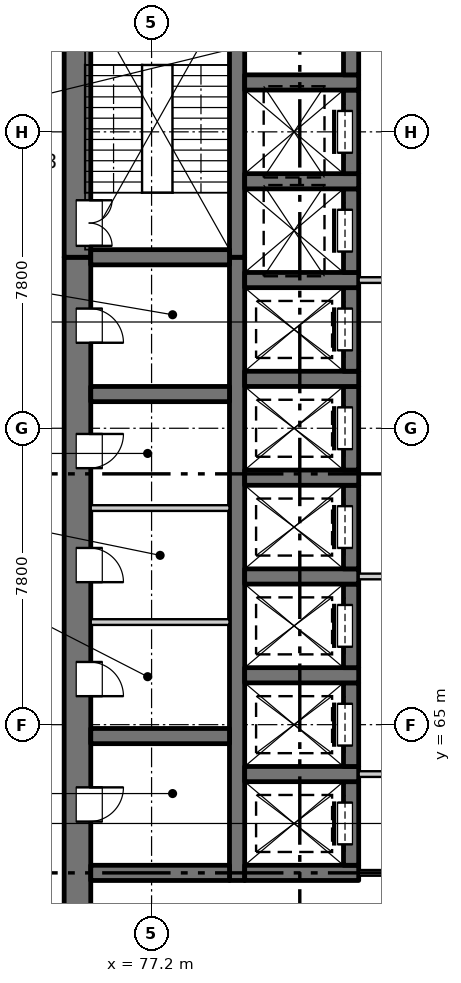
"""IFC4 building model, lengths in metres.
Left out: names, types, materials, properties, quantities, classifications, styles, units other than length and angle.
Written with IfcOpenShell. Run it as: python <this file> out.ifc"""

import sys

from ifc_helpers import new_model, si_unit, direction, frame, frame_2d, origin, place, context, subcontext, project, spatial, rectangle, extrude, element, fill, save


model = new_model("IFC4")
c1 = context("Model", 3, precision=1e-05, world=origin(), true_north=direction((0.0, 1.0)))
c2 = subcontext(c1, "Body", "Model", "MODEL_VIEW")
j1 = project(units=[si_unit("LENGTHUNIT", "METRE"), si_unit("PLANEANGLEUNIT", "RADIAN")], contexts=[c1])
p1 = place(None, origin())
s1 = spatial("IfcSite", under=j1, at=p1, CompositionType="ELEMENT")
p2 = place(p1, origin())
s2 = spatial("IfcBuilding", under=s1, at=p2, CompositionType="ELEMENT")
p3 = place(p2, frame((0.0, 0.0, 15.0)))
s3 = spatial("IfcBuildingStorey", under=s2, at=p3, CompositionType="ELEMENT", Elevation=15.0)
p4 = place(p3, frame((75.25, 54.9, -0.35), z_axis=(0.0, 0.0, 1.0), x_axis=(0.0, 1.0, 0.0)))
e1 = element("IfcWall", 1, at=p4, inside=s3, PredefinedType="SOLIDWALL", context=c2, shape_type="SweptSolid", body=[
    extrude(rectangle(XDim=22.4, YDim=0.7, at=frame_2d((11.2, 0.0))), origin(), (0.0, 0.0, 1.0), 4.6),
])
p5 = place(p4, frame((7.55, 0.0, 0.35)))
e2 = element("IfcOpeningElement", 2, at=p5, cuts=e1, PredefinedType="OPENING", context=c2, shape_type="SweptSolid", body=[
    extrude(rectangle(XDim=0.9, YDim=2.1, at=frame_2d((0.45, 1.05))), frame((0.0, 0.36, 0.0), z_axis=(0.0, -1.0, 0.0), x_axis=(1.0, 0.0, 0.0)), (0.0, 0.0, 1.0), 0.72),
])
p6 = place(p4, frame((10.85, 0.0, 0.35)))
e3 = element("IfcOpeningElement", 3, at=p6, cuts=e1, PredefinedType="OPENING", context=c2, shape_type="SweptSolid", body=[
    extrude(rectangle(XDim=0.9, YDim=2.1, at=frame_2d((0.45, 1.05))), frame((0.0, 0.36, 0.0), z_axis=(0.0, -1.0, 0.0), x_axis=(1.0, 0.0, 0.0)), (0.0, 0.0, 1.0), 0.72),
])
p7 = place(p4, frame((13.85, 0.0, 0.35)))
e4 = element("IfcOpeningElement", 4, at=p7, cuts=e1, PredefinedType="OPENING", context=c2, shape_type="SweptSolid", body=[
    extrude(rectangle(XDim=0.9, YDim=2.1, at=frame_2d((0.45, 1.05))), frame((0.0, 0.36, 0.0), z_axis=(0.0, -1.0, 0.0), x_axis=(1.0, 0.0, 0.0)), (0.0, 0.0, 1.0), 0.72),
])
p8 = place(p4, frame((16.85, 0.0, 0.35)))
e5 = element("IfcOpeningElement", 5, at=p8, cuts=e1, PredefinedType="OPENING", context=c2, shape_type="SweptSolid", body=[
    extrude(rectangle(XDim=0.9, YDim=2.1, at=frame_2d((0.45, 1.05))), frame((0.0, 0.36, 0.0), z_axis=(0.0, -1.0, 0.0), x_axis=(1.0, 0.0, 0.0)), (0.0, 0.0, 1.0), 0.72),
])
p9 = place(p4, frame((20.15, 0.0, 0.35)))
e6 = element("IfcOpeningElement", 6, at=p9, cuts=e1, PredefinedType="OPENING", context=c2, shape_type="SweptSolid", body=[
    extrude(rectangle(XDim=0.9, YDim=2.1, at=frame_2d((0.45, 1.05))), frame((0.0, 0.36, 0.0), z_axis=(0.0, -1.0, 0.0), x_axis=(1.0, 0.0, 0.0)), (0.0, 0.0, 1.0), 0.72),
])
p10 = place(p3, frame((75.25, 77.3, -0.35), z_axis=(0.0, 0.0, 1.0), x_axis=(0.0, 1.0, 0.0)))
e7 = element("IfcWall", 7, at=p10, inside=s3, PredefinedType="SOLIDWALL", context=c2, shape_type="SweptSolid", body=[
    extrude(rectangle(XDim=7.55, YDim=0.7, at=frame_2d((3.775, 0.0))), origin(), (0.0, 0.0, 1.0), 4.6),
])
p11 = place(p10, frame((0.3, 0.0, 0.35)))
e8 = element("IfcOpeningElement", 8, at=p11, cuts=e7, PredefinedType="OPENING", context=c2, shape_type="SweptSolid", body=[
    extrude(rectangle(XDim=1.2, YDim=2.1, at=frame_2d((0.6, 1.05))), frame((0.0, 0.36, 0.0), z_axis=(0.0, -1.0, 0.0), x_axis=(1.0, 0.0, 0.0)), (0.0, 0.0, 1.0), 0.72),
])
p12 = place(p3, frame((79.45, 60.9, -0.35), z_axis=(0.0, 0.0, 1.0), x_axis=(0.0, 1.0, 0.0)))
e9 = element("IfcWall", 9, at=p12, inside=s3, PredefinedType="SOLIDWALL", context=c2, shape_type="SweptSolid", body=[
    extrude(rectangle(XDim=16.4, YDim=0.4, at=frame_2d((8.2, 0.0))), origin(), (0.0, 0.0, 1.0), 4.6),
])
p13 = place(p3, frame((79.45, 77.3, -0.35), z_axis=(0.0, 0.0, 1.0), x_axis=(0.0, 1.0, 0.0)))
e10 = element("IfcWall", 10, at=p13, inside=s3, PredefinedType="SOLIDWALL", context=c2, shape_type="SweptSolid", body=[
    extrude(rectangle(XDim=6.85, YDim=0.4, at=frame_2d((3.425, 0.0))), origin(), (0.0, 0.0, 1.0), 4.6),
])
p14 = place(p3, frame((79.65, 61.1, -0.35), z_axis=(0.0, 0.0, 1.0), x_axis=(1.0, 0.0, 0.0)))
e11 = element("IfcWall", 11, at=p14, inside=s3, PredefinedType="SOLIDWALL", context=c2, shape_type="SweptSolid", body=[
    extrude(rectangle(XDim=3.0, YDim=0.4, at=frame_2d((1.5, 0.0))), origin(), (0.0, 0.0, 1.0), 4.6),
])
p15 = place(p3, frame((82.45, 61.3, -0.35), z_axis=(0.0, 0.0, 1.0), x_axis=(0.0, 1.0, 0.0)))
e12 = element("IfcWall", 12, at=p15, inside=s3, PredefinedType="SOLIDWALL", context=c2, shape_type="SweptSolid", body=[
    extrude(rectangle(XDim=2.2, YDim=0.4, at=frame_2d((1.1, 0.0))), origin(), (0.0, 0.0, 1.0), 4.6),
])
p16 = place(p15, frame((0.55, 0.0, 0.35)))
e13 = element("IfcOpeningElement", 13, at=p16, cuts=e12, PredefinedType="OPENING", context=c2, shape_type="SweptSolid", body=[
    extrude(rectangle(XDim=1.1, YDim=2.1, at=frame_2d((0.55, 1.05))), frame((0.0, 0.21, 0.0), z_axis=(0.0, -1.0, 0.0), x_axis=(1.0, 0.0, 0.0)), (0.0, 0.0, 1.0), 0.42),
])
p17 = place(p3, frame((79.65, 63.7, -0.35), z_axis=(0.0, 0.0, 1.0), x_axis=(1.0, 0.0, 0.0)))
e14 = element("IfcWall", 14, at=p17, inside=s3, PredefinedType="SOLIDWALL", context=c2, shape_type="SweptSolid", body=[
    extrude(rectangle(XDim=3.0, YDim=0.4, at=frame_2d((1.5, 0.0))), origin(), (0.0, 0.0, 1.0), 4.6),
])
p18 = place(p3, frame((82.45, 63.9, -0.35), z_axis=(0.0, 0.0, 1.0), x_axis=(0.0, 1.0, 0.0)))
e15 = element("IfcWall", 15, at=p18, inside=s3, PredefinedType="SOLIDWALL", context=c2, shape_type="SweptSolid", body=[
    extrude(rectangle(XDim=2.2, YDim=0.4, at=frame_2d((1.1, 0.0))), origin(), (0.0, 0.0, 1.0), 4.6),
])
p19 = place(p18, frame((0.55, 0.0, 0.35)))
e16 = element("IfcOpeningElement", 16, at=p19, cuts=e15, PredefinedType="OPENING", context=c2, shape_type="SweptSolid", body=[
    extrude(rectangle(XDim=1.1, YDim=2.1, at=frame_2d((0.55, 1.05))), frame((0.0, 0.21, 0.0), z_axis=(0.0, -1.0, 0.0), x_axis=(1.0, 0.0, 0.0)), (0.0, 0.0, 1.0), 0.42),
])
p20 = place(p3, frame((79.65, 66.3, -0.35), z_axis=(0.0, 0.0, 1.0), x_axis=(1.0, 0.0, 0.0)))
e17 = element("IfcWall", 17, at=p20, inside=s3, PredefinedType="SOLIDWALL", context=c2, shape_type="SweptSolid", body=[
    extrude(rectangle(XDim=3.0, YDim=0.4, at=frame_2d((1.5, 0.0))), origin(), (0.0, 0.0, 1.0), 4.6),
])
p21 = place(p3, frame((82.45, 66.5, -0.35), z_axis=(0.0, 0.0, 1.0), x_axis=(0.0, 1.0, 0.0)))
e18 = element("IfcWall", 18, at=p21, inside=s3, PredefinedType="SOLIDWALL", context=c2, shape_type="SweptSolid", body=[
    extrude(rectangle(XDim=2.2, YDim=0.4, at=frame_2d((1.1, 0.0))), origin(), (0.0, 0.0, 1.0), 4.6),
])
p22 = place(p21, frame((0.55, 0.0, 0.35)))
e19 = element("IfcOpeningElement", 19, at=p22, cuts=e18, PredefinedType="OPENING", context=c2, shape_type="SweptSolid", body=[
    extrude(rectangle(XDim=1.1, YDim=2.1, at=frame_2d((0.55, 1.05))), frame((0.0, 0.21, 0.0), z_axis=(0.0, -1.0, 0.0), x_axis=(1.0, 0.0, 0.0)), (0.0, 0.0, 1.0), 0.42),
])
p23 = place(p3, frame((79.65, 68.9, -0.35), z_axis=(0.0, 0.0, 1.0), x_axis=(1.0, 0.0, 0.0)))
e20 = element("IfcWall", 20, at=p23, inside=s3, PredefinedType="SOLIDWALL", context=c2, shape_type="SweptSolid", body=[
    extrude(rectangle(XDim=3.0, YDim=0.4, at=frame_2d((1.5, 0.0))), origin(), (0.0, 0.0, 1.0), 4.6),
])
p24 = place(p3, frame((82.45, 69.1, -0.35), z_axis=(0.0, 0.0, 1.0), x_axis=(0.0, 1.0, 0.0)))
e21 = element("IfcWall", 21, at=p24, inside=s3, PredefinedType="SOLIDWALL", context=c2, shape_type="SweptSolid", body=[
    extrude(rectangle(XDim=2.2, YDim=0.4, at=frame_2d((1.1, 0.0))), origin(), (0.0, 0.0, 1.0), 4.6),
])
p25 = place(p24, frame((0.55, 0.0, 0.35)))
e22 = element("IfcOpeningElement", 22, at=p25, cuts=e21, PredefinedType="OPENING", context=c2, shape_type="SweptSolid", body=[
    extrude(rectangle(XDim=1.1, YDim=2.1, at=frame_2d((0.55, 1.05))), frame((0.0, 0.21, 0.0), z_axis=(0.0, -1.0, 0.0), x_axis=(1.0, 0.0, 0.0)), (0.0, 0.0, 1.0), 0.42),
])
p26 = place(p3, frame((79.65, 71.5, -0.35), z_axis=(0.0, 0.0, 1.0), x_axis=(1.0, 0.0, 0.0)))
e23 = element("IfcWall", 23, at=p26, inside=s3, PredefinedType="SOLIDWALL", context=c2, shape_type="SweptSolid", body=[
    extrude(rectangle(XDim=3.0, YDim=0.4, at=frame_2d((1.5, 0.0))), origin(), (0.0, 0.0, 1.0), 4.6),
])
p27 = place(p3, frame((82.45, 71.7, -0.35), z_axis=(0.0, 0.0, 1.0), x_axis=(0.0, 1.0, 0.0)))
e24 = element("IfcWall", 24, at=p27, inside=s3, PredefinedType="SOLIDWALL", context=c2, shape_type="SweptSolid", body=[
    extrude(rectangle(XDim=2.2, YDim=0.4, at=frame_2d((1.1, 0.0))), origin(), (0.0, 0.0, 1.0), 4.6),
])
p28 = place(p27, frame((0.55, 0.0, 0.35)))
e25 = element("IfcOpeningElement", 25, at=p28, cuts=e24, PredefinedType="OPENING", context=c2, shape_type="SweptSolid", body=[
    extrude(rectangle(XDim=1.1, YDim=2.1, at=frame_2d((0.55, 1.05))), frame((0.0, 0.21, 0.0), z_axis=(0.0, -1.0, 0.0), x_axis=(1.0, 0.0, 0.0)), (0.0, 0.0, 1.0), 0.42),
])
p29 = place(p3, frame((79.65, 74.1, -0.35), z_axis=(0.0, 0.0, 1.0), x_axis=(1.0, 0.0, 0.0)))
e26 = element("IfcWall", 26, at=p29, inside=s3, PredefinedType="SOLIDWALL", context=c2, shape_type="SweptSolid", body=[
    extrude(rectangle(XDim=3.0, YDim=0.4, at=frame_2d((1.5, 0.0))), origin(), (0.0, 0.0, 1.0), 4.6),
])
p30 = place(p3, frame((82.45, 74.3, -0.35), z_axis=(0.0, 0.0, 1.0), x_axis=(0.0, 1.0, 0.0)))
e27 = element("IfcWall", 27, at=p30, inside=s3, PredefinedType="SOLIDWALL", context=c2, shape_type="SweptSolid", body=[
    extrude(rectangle(XDim=2.2, YDim=0.4, at=frame_2d((1.1, 0.0))), origin(), (0.0, 0.0, 1.0), 4.6),
])
p31 = place(p30, frame((0.55, 0.0, 0.35)))
e28 = element("IfcOpeningElement", 28, at=p31, cuts=e27, PredefinedType="OPENING", context=c2, shape_type="SweptSolid", body=[
    extrude(rectangle(XDim=1.1, YDim=2.1, at=frame_2d((0.55, 1.05))), frame((0.0, 0.21, 0.0), z_axis=(0.0, -1.0, 0.0), x_axis=(1.0, 0.0, 0.0)), (0.0, 0.0, 1.0), 0.42),
])
p32 = place(p3, frame((79.65, 76.7, -0.35), z_axis=(0.0, 0.0, 1.0), x_axis=(1.0, 0.0, 0.0)))
e29 = element("IfcWall", 29, at=p32, inside=s3, PredefinedType="SOLIDWALL", context=c2, shape_type="SweptSolid", body=[
    extrude(rectangle(XDim=3.0, YDim=0.4, at=frame_2d((1.5, 0.0))), origin(), (0.0, 0.0, 1.0), 4.6),
])
p33 = place(p3, frame((82.45, 76.9, -0.35), z_axis=(0.0, 0.0, 1.0), x_axis=(0.0, 1.0, 0.0)))
e30 = element("IfcWall", 30, at=p33, inside=s3, PredefinedType="SOLIDWALL", context=c2, shape_type="SweptSolid", body=[
    extrude(rectangle(XDim=2.2, YDim=0.4, at=frame_2d((1.1, 0.0))), origin(), (0.0, 0.0, 1.0), 4.6),
])
p34 = place(p33, frame((0.55, 0.0, 0.35)))
e31 = element("IfcOpeningElement", 31, at=p34, cuts=e30, PredefinedType="OPENING", context=c2, shape_type="SweptSolid", body=[
    extrude(rectangle(XDim=1.1, YDim=2.1, at=frame_2d((0.55, 1.05))), frame((0.0, 0.21, 0.0), z_axis=(0.0, -1.0, 0.0), x_axis=(1.0, 0.0, 0.0)), (0.0, 0.0, 1.0), 0.42),
])
p35 = place(p3, frame((79.65, 79.3, -0.35), z_axis=(0.0, 0.0, 1.0), x_axis=(1.0, 0.0, 0.0)))
e32 = element("IfcWall", 32, at=p35, inside=s3, PredefinedType="SOLIDWALL", context=c2, shape_type="SweptSolid", body=[
    extrude(rectangle(XDim=3.0, YDim=0.4, at=frame_2d((1.5, 0.0))), origin(), (0.0, 0.0, 1.0), 4.6),
])
p36 = place(p3, frame((82.45, 79.5, -0.35), z_axis=(0.0, 0.0, 1.0), x_axis=(0.0, 1.0, 0.0)))
e33 = element("IfcWall", 33, at=p36, inside=s3, PredefinedType="SOLIDWALL", context=c2, shape_type="SweptSolid", body=[
    extrude(rectangle(XDim=2.2, YDim=0.4, at=frame_2d((1.1, 0.0))), origin(), (0.0, 0.0, 1.0), 4.6),
])
p37 = place(p36, frame((0.55, 0.0, 0.35)))
e34 = element("IfcOpeningElement", 34, at=p37, cuts=e33, PredefinedType="OPENING", context=c2, shape_type="SweptSolid", body=[
    extrude(rectangle(XDim=1.1, YDim=2.1, at=frame_2d((0.55, 1.05))), frame((0.0, 0.21, 0.0), z_axis=(0.0, -1.0, 0.0), x_axis=(1.0, 0.0, 0.0)), (0.0, 0.0, 1.0), 0.42),
])
p38 = place(p3, frame((79.65, 81.9, -0.35), z_axis=(0.0, 0.0, 1.0), x_axis=(1.0, 0.0, 0.0)))
e35 = element("IfcWall", 35, at=p38, inside=s3, PredefinedType="SOLIDWALL", context=c2, shape_type="SweptSolid", body=[
    extrude(rectangle(XDim=3.0, YDim=0.4, at=frame_2d((1.5, 0.0))), origin(), (0.0, 0.0, 1.0), 4.6),
])
p39 = place(p3, frame((82.45, 82.1, -0.35), z_axis=(0.0, 0.0, 1.0), x_axis=(0.0, 1.0, 0.0)))
e36 = element("IfcWall", 36, at=p39, inside=s3, PredefinedType="SOLIDWALL", context=c2, shape_type="SweptSolid", body=[
    extrude(rectangle(XDim=2.05, YDim=0.4, at=frame_2d((1.025, 0.0))), origin(), (0.0, 0.0, 1.0), 4.6),
])
p40 = place(p39, frame((0.65, 0.0, 0.35)))
e37 = element("IfcOpeningElement", 37, at=p40, cuts=e36, PredefinedType="OPENING", context=c2, shape_type="SweptSolid", body=[
    extrude(rectangle(XDim=0.9, YDim=2.1, at=frame_2d((0.45, 1.05))), frame((0.0, 0.21, 0.0), z_axis=(0.0, -1.0, 0.0), x_axis=(1.0, 0.0, 0.0)), (0.0, 0.0, 1.0), 0.42),
])
for number, where, z_axis, x_axis in (
    (38, (75.6, 61.1, -0.35), (0.0, 0.0, 1.0), (1.0, 0.0, 0.0)),
    (39, (75.6, 64.7, -0.35), (0.0, 0.0, 1.0), (1.0, 0.0, 0.0)),
    (40, (75.6, 73.7, -0.35), (0.0, 0.0, 1.0), (1.0, 0.0, 0.0)),
    (41, (75.6, 77.3, -0.35), (0.0, 0.0, 1.0), (1.0, 0.0, 0.0)),
):
    element("IfcWall", number, at=place(p3, frame(where, z_axis=z_axis, x_axis=x_axis)), inside=s3, PredefinedType="SOLIDWALL", context=c2, shape_type="SweptSolid", body=[
        extrude(rectangle(XDim=3.65, YDim=0.4, at=frame_2d((1.825, 0.0))), origin(), (0.0, 0.0, 1.0), 4.6),
    ])
p41 = place(p3, frame((82.65, 61.1, 0.0), z_axis=(0.0, 0.0, 1.0), x_axis=(1.0, 0.0, 0.0)))
e42 = element("IfcWall", 42, at=p41, inside=s3, PredefinedType="PARTITIONING", context=c2, shape_type="SweptSolid", body=[
    extrude(rectangle(XDim=4.7, YDim=0.15, at=frame_2d((2.35, 0.0))), origin(), (0.0, 0.0, 1.0), 4.25),
])
p42 = place(p41, frame((1.45, 0.0, 0.0)))
e43 = element("IfcOpeningElement", 43, at=p42, cuts=e42, PredefinedType="OPENING", context=c2, shape_type="SweptSolid", body=[
    extrude(rectangle(XDim=1.8, YDim=2.1, at=frame_2d((0.9, 1.05))), frame((0.0, 0.085, 0.0), z_axis=(0.0, -1.0, 0.0), x_axis=(1.0, 0.0, 0.0)), (0.0, 0.0, 1.0), 0.17),
])
p43 = place(p3, frame((82.65, 63.7, 0.0), z_axis=(0.0, 0.0, 1.0), x_axis=(1.0, 0.0, 0.0)))
e44 = element("IfcWall", 44, at=p43, inside=s3, PredefinedType="PARTITIONING", context=c2, shape_type="SweptSolid", body=[
    extrude(rectangle(XDim=4.7, YDim=0.15, at=frame_2d((2.35, 0.0))), origin(), (0.0, 0.0, 1.0), 4.25),
])
p44 = place(p43, frame((1.45, 0.0, 0.0)))
e45 = element("IfcOpeningElement", 45, at=p44, cuts=e44, PredefinedType="OPENING", context=c2, shape_type="SweptSolid", body=[
    extrude(rectangle(XDim=1.8, YDim=2.1, at=frame_2d((0.9, 1.05))), frame((0.0, 0.085, 0.0), z_axis=(0.0, -1.0, 0.0), x_axis=(1.0, 0.0, 0.0)), (0.0, 0.0, 1.0), 0.17),
])
p45 = place(p3, frame((75.6, 67.7, 0.0), z_axis=(0.0, 0.0, 1.0), x_axis=(1.0, 0.0, 0.0)))
e46 = element("IfcWall", 46, at=p45, inside=s3, PredefinedType="PARTITIONING", context=c2, shape_type="SweptSolid", body=[
    extrude(rectangle(XDim=3.65, YDim=0.15, at=frame_2d((1.825, 0.0))), origin(), (0.0, 0.0, 1.0), 4.25),
])
p46 = place(p3, frame((82.65, 68.9, 0.0), z_axis=(0.0, 0.0, 1.0), x_axis=(1.0, 0.0, 0.0)))
e47 = element("IfcWall", 47, at=p46, inside=s3, PredefinedType="PARTITIONING", context=c2, shape_type="SweptSolid", body=[
    extrude(rectangle(XDim=4.7, YDim=0.15, at=frame_2d((2.35, 0.0))), origin(), (0.0, 0.0, 1.0), 4.25),
])
p47 = place(p46, frame((1.45, 0.0, 0.0)))
e48 = element("IfcOpeningElement", 48, at=p47, cuts=e47, PredefinedType="OPENING", context=c2, shape_type="SweptSolid", body=[
    extrude(rectangle(XDim=1.8, YDim=2.1, at=frame_2d((0.9, 1.05))), frame((0.0, 0.085, 0.0), z_axis=(0.0, -1.0, 0.0), x_axis=(1.0, 0.0, 0.0)), (0.0, 0.0, 1.0), 0.17),
])
p48 = place(p3, frame((75.6, 70.7, 0.0), z_axis=(0.0, 0.0, 1.0), x_axis=(1.0, 0.0, 0.0)))
e49 = element("IfcWall", 49, at=p48, inside=s3, PredefinedType="PARTITIONING", context=c2, shape_type="SweptSolid", body=[
    extrude(rectangle(XDim=3.65, YDim=0.15, at=frame_2d((1.825, 0.0))), origin(), (0.0, 0.0, 1.0), 4.25),
])
p49 = place(p3, frame((82.65, 76.7, 0.0), z_axis=(0.0, 0.0, 1.0), x_axis=(1.0, 0.0, 0.0)))
e50 = element("IfcWall", 50, at=p49, inside=s3, PredefinedType="PARTITIONING", context=c2, shape_type="SweptSolid", body=[
    extrude(rectangle(XDim=4.7, YDim=0.15, at=frame_2d((2.35, 0.0))), origin(), (0.0, 0.0, 1.0), 4.25),
])
p50 = place(p49, frame((1.45, 0.0, 0.0)))
e51 = element("IfcOpeningElement", 51, at=p50, cuts=e50, PredefinedType="OPENING", context=c2, shape_type="SweptSolid", body=[
    extrude(rectangle(XDim=1.8, YDim=2.1, at=frame_2d((0.9, 1.05))), frame((0.0, 0.085, 0.0), z_axis=(0.0, -1.0, 0.0), x_axis=(1.0, 0.0, 0.0)), (0.0, 0.0, 1.0), 0.17),
])
p51 = place(p16, origin())
e52 = element("IfcDoor", 52, at=p51, inside=s3, OperationType="SLIDING_TO_RIGHT", PredefinedType="DOOR", context=c2, shape_type="SweptSolid", body=[
    extrude(rectangle(XDim=1.1, YDim=2.1, at=frame_2d((0.55, 1.05))), frame((0.0, 0.185, 0.0), z_axis=(0.0, -1.0, 0.0), x_axis=(1.0, 0.0, 0.0)), (0.0, 0.0, 1.0), 0.05),
])
fill(e13, e52)
p52 = place(p5, origin())
e53 = element("IfcDoor", 53, at=p52, inside=s3, OperationType="SINGLE_SWING_LEFT", PredefinedType="DOOR", context=c2, shape_type="SweptSolid", body=[
    extrude(rectangle(XDim=0.9, YDim=2.1, at=frame_2d((0.45, 1.05))), frame((0.0, -0.285, 0.0), z_axis=(0.0, -1.0, 0.0), x_axis=(1.0, 0.0, 0.0)), (0.0, 0.0, 1.0), 0.05),
])
fill(e2, e53)
p53 = place(p19, origin())
e54 = element("IfcDoor", 54, at=p53, inside=s3, OperationType="SLIDING_TO_RIGHT", PredefinedType="DOOR", context=c2, shape_type="SweptSolid", body=[
    extrude(rectangle(XDim=1.1, YDim=2.1, at=frame_2d((0.55, 1.05))), frame((0.0, 0.185, 0.0), z_axis=(0.0, -1.0, 0.0), x_axis=(1.0, 0.0, 0.0)), (0.0, 0.0, 1.0), 0.05),
])
fill(e16, e54)
p54 = place(p6, origin())
e55 = element("IfcDoor", 55, at=p54, inside=s3, OperationType="SINGLE_SWING_RIGHT", PredefinedType="DOOR", context=c2, shape_type="SweptSolid", body=[
    extrude(rectangle(XDim=0.9, YDim=2.1, at=frame_2d((0.45, 1.05))), frame((0.0, -0.285, 0.0), z_axis=(0.0, -1.0, 0.0), x_axis=(1.0, 0.0, 0.0)), (0.0, 0.0, 1.0), 0.05),
])
fill(e3, e55)
p55 = place(p22, origin())
e56 = element("IfcDoor", 56, at=p55, inside=s3, OperationType="SLIDING_TO_RIGHT", PredefinedType="DOOR", context=c2, shape_type="SweptSolid", body=[
    extrude(rectangle(XDim=1.1, YDim=2.1, at=frame_2d((0.55, 1.05))), frame((0.0, 0.185, 0.0), z_axis=(0.0, -1.0, 0.0), x_axis=(1.0, 0.0, 0.0)), (0.0, 0.0, 1.0), 0.05),
])
fill(e19, e56)
p56 = place(p7, origin())
e57 = element("IfcDoor", 57, at=p56, inside=s3, OperationType="SINGLE_SWING_RIGHT", PredefinedType="DOOR", context=c2, shape_type="SweptSolid", body=[
    extrude(rectangle(XDim=0.9, YDim=2.1, at=frame_2d((0.45, 1.05))), frame((0.0, -0.285, 0.0), z_axis=(0.0, -1.0, 0.0), x_axis=(1.0, 0.0, 0.0)), (0.0, 0.0, 1.0), 0.05),
])
fill(e4, e57)
p57 = place(p25, origin())
e58 = element("IfcDoor", 58, at=p57, inside=s3, OperationType="SLIDING_TO_LEFT", PredefinedType="DOOR", context=c2, shape_type="SweptSolid", body=[
    extrude(rectangle(XDim=1.1, YDim=2.1, at=frame_2d((0.55, 1.05))), frame((0.0, 0.185, 0.0), z_axis=(0.0, -1.0, 0.0), x_axis=(1.0, 0.0, 0.0)), (0.0, 0.0, 1.0), 0.05),
])
fill(e22, e58)
p58 = place(p8, origin())
e59 = element("IfcDoor", 59, at=p58, inside=s3, OperationType="SINGLE_SWING_LEFT", PredefinedType="DOOR", context=c2, shape_type="SweptSolid", body=[
    extrude(rectangle(XDim=0.9, YDim=2.1, at=frame_2d((0.45, 1.05))), frame((0.0, -0.285, 0.0), z_axis=(0.0, -1.0, 0.0), x_axis=(1.0, 0.0, 0.0)), (0.0, 0.0, 1.0), 0.05),
])
fill(e5, e59)
p59 = place(p28, origin())
e60 = element("IfcDoor", 60, at=p59, inside=s3, OperationType="SLIDING_TO_LEFT", PredefinedType="DOOR", context=c2, shape_type="SweptSolid", body=[
    extrude(rectangle(XDim=1.1, YDim=2.1, at=frame_2d((0.55, 1.05))), frame((0.0, 0.185, 0.0), z_axis=(0.0, -1.0, 0.0), x_axis=(1.0, 0.0, 0.0)), (0.0, 0.0, 1.0), 0.05),
])
fill(e25, e60)
p60 = place(p31, origin())
e61 = element("IfcDoor", 61, at=p60, inside=s3, OperationType="SLIDING_TO_LEFT", PredefinedType="DOOR", context=c2, shape_type="SweptSolid", body=[
    extrude(rectangle(XDim=1.1, YDim=2.1, at=frame_2d((0.55, 1.05))), frame((0.0, 0.185, 0.0), z_axis=(0.0, -1.0, 0.0), x_axis=(1.0, 0.0, 0.0)), (0.0, 0.0, 1.0), 0.05),
])
fill(e28, e61)
p61 = place(p9, origin())
e62 = element("IfcDoor", 62, at=p61, inside=s3, OperationType="SINGLE_SWING_RIGHT", PredefinedType="DOOR", context=c2, shape_type="SweptSolid", body=[
    extrude(rectangle(XDim=0.9, YDim=2.1, at=frame_2d((0.45, 1.05))), frame((0.0, -0.285, 0.0), z_axis=(0.0, -1.0, 0.0), x_axis=(1.0, 0.0, 0.0)), (0.0, 0.0, 1.0), 0.05),
])
fill(e6, e62)
p62 = place(p34, origin())
e63 = element("IfcDoor", 63, at=p62, inside=s3, OperationType="SLIDING_TO_LEFT", PredefinedType="DOOR", context=c2, shape_type="SweptSolid", body=[
    extrude(rectangle(XDim=1.1, YDim=2.1, at=frame_2d((0.55, 1.05))), frame((0.0, 0.185, 0.0), z_axis=(0.0, -1.0, 0.0), x_axis=(1.0, 0.0, 0.0)), (0.0, 0.0, 1.0), 0.05),
])
fill(e31, e63)
p63 = place(p11, origin())
e64 = element("IfcDoor", 64, at=p63, inside=s3, OperationType="DOUBLE_DOOR_SINGLE_SWING", PredefinedType="DOOR", context=c2, shape_type="SweptSolid", body=[
    extrude(rectangle(XDim=1.2, YDim=2.1, at=frame_2d((0.6, 1.05))), frame((0.0, -0.285, 0.0), z_axis=(0.0, -1.0, 0.0), x_axis=(1.0, 0.0, 0.0)), (0.0, 0.0, 1.0), 0.05),
])
fill(e8, e64)
p64 = place(p37, origin())
e65 = element("IfcDoor", 65, at=p64, inside=s3, OperationType="SLIDING_TO_LEFT", PredefinedType="DOOR", context=c2, shape_type="SweptSolid", body=[
    extrude(rectangle(XDim=1.1, YDim=2.1, at=frame_2d((0.55, 1.05))), frame((0.0, 0.185, 0.0), z_axis=(0.0, -1.0, 0.0), x_axis=(1.0, 0.0, 0.0)), (0.0, 0.0, 1.0), 0.05),
])
fill(e34, e65)
save(model, sys.argv[1])
